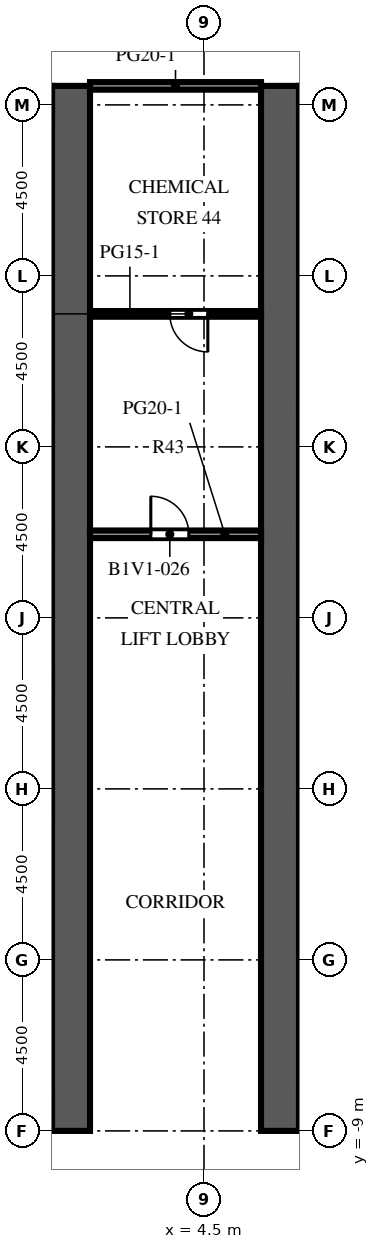
"""IFC4 building model, lengths in metres.
Left out: names, types, materials, properties, quantities, classifications, styles, units other than length and angle.
Written with IfcOpenShell. Run it as: python <this file> out.ifc"""

import sys

from ifc_helpers import new_model, si_unit, direction, frame, frame_2d, origin, place, context, subcontext, project, spatial, rectangle, extrude, element, fill, save


model = new_model("IFC4")
c1 = context("Model", 3, precision=1e-05, world=origin(), true_north=direction((0.0, 1.0)))
c2 = subcontext(c1, "Body", "Model", "MODEL_VIEW")
j1 = project(units=[si_unit("LENGTHUNIT", "METRE"), si_unit("PLANEANGLEUNIT", "RADIAN")], contexts=[c1])
p1 = place(None, origin())
s1 = spatial("IfcSite", under=j1, at=p1, CompositionType="ELEMENT")
p2 = place(p1, origin())
s2 = spatial("IfcBuilding", under=s1, at=p2, CompositionType="ELEMENT")
p3 = place(p2, frame((0.0, 0.0, 19.5)))
s3 = spatial("IfcBuildingStorey", under=s2, at=p3, CompositionType="ELEMENT", Elevation=19.5)
p4 = place(p3, frame((1.0, -9.0, 0.0), z_axis=(0.0, 0.0, 1.0), x_axis=(0.0, 1.0, 0.0)))
e1 = element("IfcWall", 1, at=p4, inside=s3, PredefinedType="SHEAR", context=c2, shape_type="SweptSolid", body=[
    extrude(rectangle(XDim=27.5, YDim=1.0, at=frame_2d((13.75, 0.0))), origin(), (0.0, 0.0, 1.0), 4.1),
])
p5 = place(p4, frame((12.55, 0.0, 0.0)))
e2 = element("IfcOpeningElement", 2, at=p5, cuts=e1, PredefinedType="OPENING", context=c2, shape_type="SweptSolid", body=[
    extrude(rectangle(XDim=2.4, YDim=2.4, at=frame_2d((1.2, 1.2))), frame((0.0, 0.51, 0.0), z_axis=(0.0, -1.0, 0.0), x_axis=(1.0, 0.0, 0.0)), (0.0, 0.0, 1.0), 1.02),
])
p6 = place(p4, frame((3.955, 0.0, 0.0)))
e3 = element("IfcOpeningElement", 3, at=p6, cuts=e1, PredefinedType="OPENING", context=c2, shape_type="SweptSolid", body=[
    extrude(rectangle(XDim=0.905, YDim=2.1, at=frame_2d((0.453, 1.05))), frame((0.0, 0.51, 0.0), z_axis=(0.0, -1.0, 0.0), x_axis=(1.0, 0.0, 0.0)), (0.0, 0.0, 1.0), 1.02),
])
p7 = place(p4, frame((23.363, 0.0, 0.0)))
e4 = element("IfcOpeningElement", 4, at=p7, cuts=e1, PredefinedType="OPENING", context=c2, shape_type="SweptSolid", body=[
    extrude(rectangle(XDim=1.2, YDim=2.1, at=frame_2d((0.6, 1.05))), frame((0.0, 0.51, 0.0), z_axis=(0.0, -1.0, 0.0), x_axis=(1.0, 0.0, 0.0)), (0.0, 0.0, 1.0), 1.02),
])
p8 = place(p3, frame((6.5, -9.0, 0.0), z_axis=(0.0, 0.0, 1.0), x_axis=(0.0, 1.0, 0.0)))
e5 = element("IfcWall", 5, at=p8, inside=s3, PredefinedType="SHEAR", context=c2, shape_type="SweptSolid", body=[
    extrude(rectangle(XDim=27.5, YDim=1.0, at=frame_2d((13.75, 0.0))), origin(), (0.0, 0.0, 1.0), 4.1),
])
p9 = place(p8, frame((12.55, 0.0, 0.0)))
e6 = element("IfcOpeningElement", 6, at=p9, cuts=e5, PredefinedType="OPENING", context=c2, shape_type="SweptSolid", body=[
    extrude(rectangle(XDim=2.4, YDim=2.4, at=frame_2d((1.2, 1.2))), frame((0.0, 0.51, 0.0), z_axis=(0.0, -1.0, 0.0), x_axis=(1.0, 0.0, 0.0)), (0.0, 0.0, 1.0), 1.02),
])
p10 = place(p8, frame((3.955, 0.0, 0.0)))
e7 = element("IfcOpeningElement", 7, at=p10, cuts=e5, PredefinedType="OPENING", context=c2, shape_type="SweptSolid", body=[
    extrude(rectangle(XDim=0.905, YDim=2.1, at=frame_2d((0.453, 1.05))), frame((0.0, 0.51, 0.0), z_axis=(0.0, -1.0, 0.0), x_axis=(1.0, 0.0, 0.0)), (0.0, 0.0, 1.0), 1.02),
])
p11 = place(p8, frame((23.363, 0.0, 0.0)))
e8 = element("IfcOpeningElement", 8, at=p11, cuts=e5, PredefinedType="OPENING", context=c2, shape_type="SweptSolid", body=[
    extrude(rectangle(XDim=1.2, YDim=2.1, at=frame_2d((0.6, 1.05))), frame((0.0, 0.51, 0.0), z_axis=(0.0, -1.0, 0.0), x_axis=(1.0, 0.0, 0.0)), (0.0, 0.0, 1.0), 1.02),
])
p12 = place(p3, frame((-2.445, -3.94, 0.0), z_axis=(0.0, 0.0, 1.0), x_axis=(1.0, 0.0, 0.0)))
e9 = element("IfcWall", 9, at=p12, inside=s3, PredefinedType="PARTITIONING", context=c2, shape_type="SweptSolid", body=[
    extrude(rectangle(XDim=2.945, YDim=0.1, at=frame_2d((1.473, 0.0))), origin(), (0.0, 0.0, 1.0), 3.65),
])
p13 = place(p12, frame((0.972, 0.0, 0.0)))
e10 = element("IfcOpeningElement", 10, at=p13, cuts=e9, PredefinedType="OPENING", context=c2, shape_type="SweptSolid", body=[
    extrude(rectangle(XDim=1.0, YDim=2.1, at=frame_2d((0.5, 1.05))), frame((0.0, 0.06, 0.0), z_axis=(0.0, -1.0, 0.0), x_axis=(1.0, 0.0, 0.0)), (0.0, 0.0, 1.0), 0.12),
])
p14 = place(p3, frame((7.0, 12.425, 0.0), z_axis=(0.0, 0.0, 1.0), x_axis=(1.0, 0.0, 0.0)))
e11 = element("IfcWall", 11, at=p14, inside=s3, PredefinedType="PARTITIONING", context=c2, shape_type="SweptSolid", body=[
    extrude(rectangle(XDim=1.3, YDim=0.1, at=frame_2d((0.65, 0.0))), origin(), (0.0, 0.0, 1.0), 3.65),
])
p15 = place(p14, frame((0.2, 0.0, 0.0)))
e12 = element("IfcOpeningElement", 12, at=p15, cuts=e11, PredefinedType="OPENING", context=c2, shape_type="SweptSolid", body=[
    extrude(rectangle(XDim=0.9, YDim=2.1, at=frame_2d((0.45, 1.05))), frame((0.0, 0.06, 0.0), z_axis=(0.0, -1.0, 0.0), x_axis=(1.0, 0.0, 0.0)), (0.0, 0.0, 1.0), 0.12),
])
p16 = place(p3, frame((1.5, 6.7, 0.0), z_axis=(0.0, 0.0, 1.0), x_axis=(1.0, 0.0, 0.0)))
e13 = element("IfcWall", 13, at=p16, inside=s3, PredefinedType="PARTITIONING", context=c2, shape_type="SweptSolid", body=[
    extrude(rectangle(XDim=4.5, YDim=0.2, at=frame_2d((2.25, 0.0))), origin(), (0.0, 0.0, 1.0), 3.65),
])
p17 = place(p16, frame((1.6, 0.0, 0.0)))
e14 = element("IfcOpeningElement", 14, at=p17, cuts=e13, PredefinedType="OPENING", context=c2, shape_type="SweptSolid", body=[
    extrude(rectangle(XDim=1.0, YDim=2.1, at=frame_2d((0.5, 1.05))), frame((0.0, 0.11, 0.0), z_axis=(0.0, -1.0, 0.0), x_axis=(1.0, 0.0, 0.0)), (0.0, 0.0, 1.0), 0.22),
])
p18 = place(p3, frame((1.5, 12.5, 0.0), z_axis=(0.0, 0.0, 1.0), x_axis=(1.0, 0.0, 0.0)))
e15 = element("IfcWall", 15, at=p18, inside=s3, PredefinedType="PARTITIONING", context=c2, shape_type="SweptSolid", body=[
    extrude(rectangle(XDim=4.5, YDim=0.15, at=frame_2d((2.25, 0.0))), origin(), (0.0, 0.0, 1.0), 3.65),
])
p19 = place(p18, frame((2.1, 0.0, 0.0)))
e16 = element("IfcOpeningElement", 16, at=p19, cuts=e15, PredefinedType="OPENING", context=c2, shape_type="SweptSolid", body=[
    extrude(rectangle(XDim=1.0, YDim=2.1, at=frame_2d((0.5, 1.05))), frame((0.0, 0.085, 0.0), z_axis=(0.0, -1.0, 0.0), x_axis=(1.0, 0.0, 0.0)), (0.0, 0.0, 1.0), 0.17),
])
p20 = place(p3, frame((1.5, 18.5, 0.0), z_axis=(0.0, 0.0, 1.0), x_axis=(1.0, 0.0, 0.0)))
e17 = element("IfcWall", 17, at=p20, inside=s3, PredefinedType="PARTITIONING", context=c2, shape_type="SweptSolid", body=[
    extrude(rectangle(XDim=4.5, YDim=0.2, at=frame_2d((2.25, 0.0))), origin(), (0.0, 0.0, 1.0), 3.65),
])
p21 = place(p5, origin())
e18 = element("IfcDoor", 18, at=p21, inside=s3, OperationType="DOUBLE_DOOR_DOUBLE_SWING", PredefinedType="DOOR", context=c2, shape_type="SweptSolid", body=[
    extrude(rectangle(XDim=2.4, YDim=2.4, at=frame_2d((1.2, 1.2))), frame((0.0, 0.025, 0.0), z_axis=(0.0, -1.0, 0.0), x_axis=(1.0, 0.0, 0.0)), (0.0, 0.0, 1.0), 0.05),
])
fill(e2, e18)
p22 = place(p9, origin())
e19 = element("IfcDoor", 19, at=p22, inside=s3, OperationType="DOUBLE_DOOR_DOUBLE_SWING", PredefinedType="DOOR", context=c2, shape_type="SweptSolid", body=[
    extrude(rectangle(XDim=2.4, YDim=2.4, at=frame_2d((1.2, 1.2))), frame((0.0, 0.025, 0.0), z_axis=(0.0, -1.0, 0.0), x_axis=(1.0, 0.0, 0.0)), (0.0, 0.0, 1.0), 0.05),
])
fill(e6, e19)
p23 = place(p6, origin())
e20 = element("IfcDoor", 20, at=p23, inside=s3, OperationType="SINGLE_SWING_LEFT", PredefinedType="DOOR", context=c2, shape_type="SweptSolid", body=[
    extrude(rectangle(XDim=0.905, YDim=2.1, at=frame_2d((0.453, 1.05))), frame((0.0, 0.475, 0.0), z_axis=(0.0, -1.0, 0.0), x_axis=(1.0, 0.0, 0.0)), (0.0, 0.0, 1.0), 0.05),
])
fill(e3, e20)
p24 = place(p7, origin())
e21 = element("IfcDoor", 21, at=p24, inside=s3, OperationType="SINGLE_SWING_RIGHT", PredefinedType="DOOR", context=c2, shape_type="SweptSolid", body=[
    extrude(rectangle(XDim=1.2, YDim=2.1, at=frame_2d((0.6, 1.05))), frame((0.0, 0.475, 0.0), z_axis=(0.0, -1.0, 0.0), x_axis=(1.0, 0.0, 0.0)), (0.0, 0.0, 1.0), 0.05),
])
fill(e4, e21)
p25 = place(p10, origin())
e22 = element("IfcDoor", 22, at=p25, inside=s3, OperationType="SINGLE_SWING_RIGHT", PredefinedType="DOOR", context=c2, shape_type="SweptSolid", body=[
    extrude(rectangle(XDim=0.905, YDim=2.1, at=frame_2d((0.453, 1.05))), frame((0.0, -0.425, 0.0), z_axis=(0.0, -1.0, 0.0), x_axis=(1.0, 0.0, 0.0)), (0.0, 0.0, 1.0), 0.05),
])
fill(e7, e22)
p26 = place(p11, origin())
e23 = element("IfcDoor", 23, at=p26, inside=s3, OperationType="SINGLE_SWING_LEFT", PredefinedType="DOOR", context=c2, shape_type="SweptSolid", body=[
    extrude(rectangle(XDim=1.2, YDim=2.1, at=frame_2d((0.6, 1.05))), frame((0.0, -0.425, 0.0), z_axis=(0.0, -1.0, 0.0), x_axis=(1.0, 0.0, 0.0)), (0.0, 0.0, 1.0), 0.05),
])
fill(e8, e23)
p27 = place(p17, origin())
e24 = element("IfcDoor", 24, at=p27, inside=s3, OperationType="SINGLE_SWING_LEFT", PredefinedType="DOOR", context=c2, shape_type="SweptSolid", body=[
    extrude(rectangle(XDim=1.0, YDim=2.1, at=frame_2d((0.5, 1.05))), frame((0.0, 0.025, 0.0), z_axis=(0.0, -1.0, 0.0), x_axis=(1.0, 0.0, 0.0)), (0.0, 0.0, 1.0), 0.05),
])
fill(e14, e24)
p28 = place(p19, origin())
e25 = element("IfcDoor", 25, at=p28, inside=s3, OperationType="SINGLE_SWING_RIGHT", PredefinedType="DOOR", context=c2, shape_type="SweptSolid", body=[
    extrude(rectangle(XDim=1.0, YDim=2.1, at=frame_2d((0.5, 1.05))), frame((0.0, 0.025, 0.0), z_axis=(0.0, -1.0, 0.0), x_axis=(1.0, 0.0, 0.0)), (0.0, 0.0, 1.0), 0.05),
])
fill(e16, e25)
save(model, sys.argv[1])
